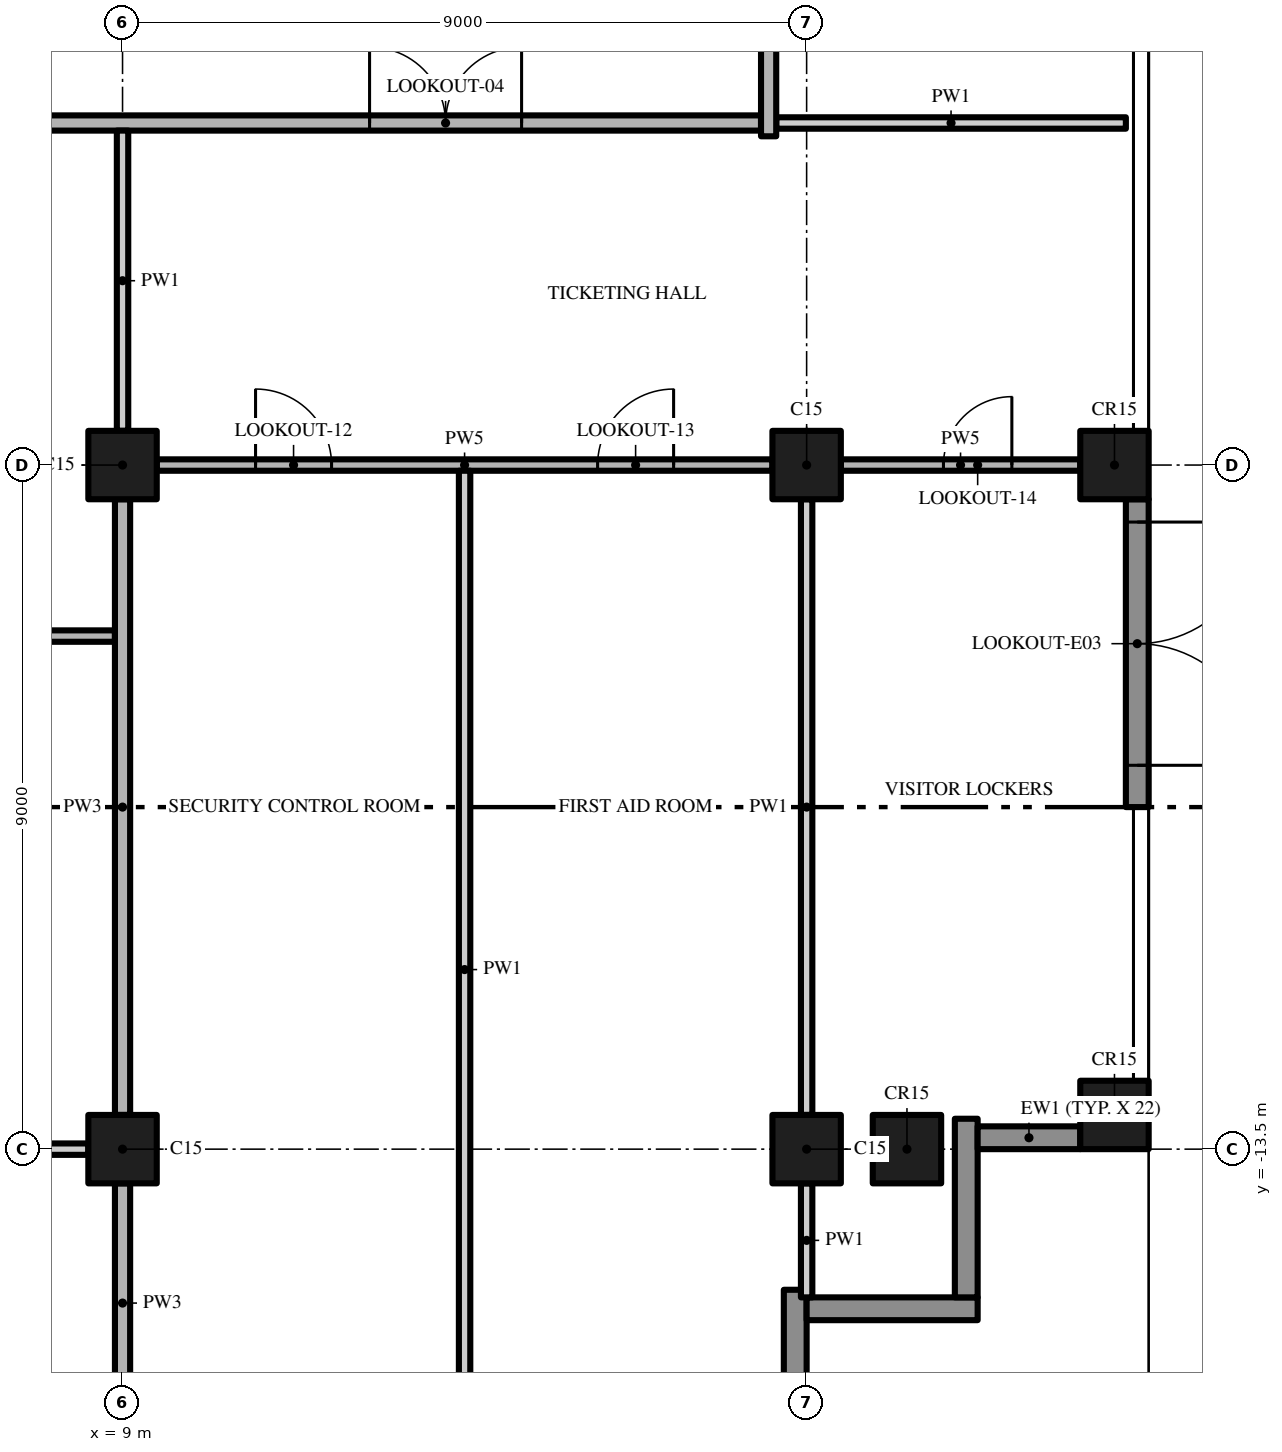
"""IFC4 building model, lengths in metres.
Left out: names, types, materials, properties, quantities, classifications, styles, units other than length and angle.
Written with IfcOpenShell. Run it as: python <this file> out.ifc"""

import sys

from ifc_helpers import new_model, si_unit, direction, frame, frame_2d, origin, origin_2d, place, context, subcontext, project, spatial, rectangle, extrude, element, fill, save


model = new_model("IFC4")
c1 = context("Model", 3, precision=1e-05, world=origin(), true_north=direction((0.0, 1.0)))
c2 = subcontext(c1, "Body", "Model", "MODEL_VIEW")
j1 = project(units=[si_unit("LENGTHUNIT", "METRE"), si_unit("PLANEANGLEUNIT", "RADIAN")], contexts=[c1])
p1 = place(None, origin())
s1 = spatial("IfcSite", under=j1, at=p1, CompositionType="ELEMENT")
p2 = place(p1, origin())
s2 = spatial("IfcBuilding", under=s1, at=p2, CompositionType="ELEMENT")
p3 = place(p2, frame((0.0, 0.0, 297.4)))
s3 = spatial("IfcBuildingStorey", under=s2, at=p3, CompositionType="ELEMENT", Elevation=297.4)
for number, where, z_axis, x_axis in (
    (1, (18.0, -13.5, 0.0), (0.0, 0.0, 1.0), (1.0, 0.0, 0.0)),
    (2, (18.0, -4.5, 0.0), (0.0, 0.0, 1.0), (1.0, 0.0, 0.0)),
    (3, (22.05, -13.05, 0.0), (0.0, 0.0, 1.0), (1.0, 0.0, 0.0)),
    (4, (19.32, -13.5, 0.0), (0.0, 0.0, 1.0), (1.0, 0.0, 0.0)),
    (5, (22.05, -4.5, 0.0), (0.0, 0.0, 1.0), (1.0, 0.0, 0.0)),
    (6, (9.0, -13.5, 0.0), (0.0, 0.0, 1.0), (1.0, 0.0, 0.0)),
    (7, (9.0, -4.5, 0.0), (0.0, 0.0, 1.0), (1.0, 0.0, 0.0)),
):
    element("IfcColumn", number, at=place(p3, frame(where, z_axis=z_axis, x_axis=x_axis)), inside=s3, PredefinedType="COLUMN", context=c2, shape_type="SweptSolid", body=[
        extrude(rectangle(XDim=0.9, YDim=0.9, at=origin_2d()), origin(), (0.0, 0.0, 1.0), 5.65),
    ])
p4 = place(p3, frame((17.85, -15.35, 0.0), z_axis=(0.0, 0.0, 1.0), x_axis=(0.0, -1.0, 0.0)))
e8 = element("IfcWall", 8, at=p4, inside=s3, PredefinedType="SOLIDWALL", context=c2, shape_type="SweptSolid", body=[
    extrude(rectangle(XDim=1.75, YDim=0.3, at=frame_2d((0.875, 0.0))), origin(), (0.0, 0.0, 1.0), 5.65),
])
p5 = place(p3, frame((20.25, -15.6, 0.0), z_axis=(0.0, 0.0, 1.0), x_axis=(-1.0, 0.0, 0.0)))
e9 = element("IfcWall", 9, at=p5, inside=s3, PredefinedType="SOLIDWALL", context=c2, shape_type="SweptSolid", body=[
    extrude(rectangle(XDim=2.25, YDim=0.3, at=frame_2d((1.125, 0.0))), origin(), (0.0, 0.0, 1.0), 5.65),
])
p6 = place(p3, frame((20.1, -13.1, 0.0), z_axis=(0.0, 0.0, 1.0), x_axis=(0.0, -1.0, 0.0)))
e10 = element("IfcWall", 10, at=p6, inside=s3, PredefinedType="SOLIDWALL", context=c2, shape_type="SweptSolid", body=[
    extrude(rectangle(XDim=2.35, YDim=0.3, at=frame_2d((1.175, 0.0))), origin(), (0.0, 0.0, 1.0), 5.65),
])
p7 = place(p3, frame((21.6, -13.35, 0.0), z_axis=(0.0, 0.0, 1.0), x_axis=(-1.0, 0.0, 0.0)))
e11 = element("IfcWall", 11, at=p7, inside=s3, PredefinedType="SOLIDWALL", context=c2, shape_type="SweptSolid", body=[
    extrude(rectangle(XDim=1.35, YDim=0.3, at=frame_2d((0.675, 0.0))), origin(), (0.0, 0.0, 1.0), 5.65),
])
p8 = place(p3, frame((22.35, -4.95, 0.0), z_axis=(0.0, 0.0, 1.0), x_axis=(0.0, -1.0, 0.0)))
e12 = element("IfcWall", 12, at=p8, inside=s3, PredefinedType="SOLIDWALL", context=c2, shape_type="SweptSolid", body=[
    extrude(rectangle(XDim=4.05, YDim=0.3, at=frame_2d((2.025, 0.0))), origin(), (0.0, 0.0, 1.0), 5.65),
])
p9 = place(p8, frame((0.3, 0.0, 0.0)))
e13 = element("IfcOpeningElement", 13, at=p9, cuts=e12, PredefinedType="OPENING", context=c2, shape_type="SweptSolid", body=[
    extrude(rectangle(XDim=3.2, YDim=2.4, at=frame_2d((1.6, 1.2))), frame((0.0, 0.16, 0.0), z_axis=(0.0, -1.0, 0.0), x_axis=(1.0, 0.0, 0.0)), (0.0, 0.0, 1.0), 0.32),
])
p10 = place(p3, frame((2.325, -13.5, 0.0), z_axis=(0.0, 0.0, 1.0), x_axis=(1.0, 0.0, 0.0)))
e14 = element("IfcWall", 14, at=p10, inside=s3, PredefinedType="PARTITIONING", context=c2, shape_type="SweptSolid", body=[
    extrude(rectangle(XDim=6.225, YDim=0.15, at=frame_2d((3.112, 0.0))), origin(), (0.0, 0.0, 1.0), 5.65),
])
p11 = place(p3, frame((-4.425, -6.75, 0.0), z_axis=(0.0, 0.0, 1.0), x_axis=(1.0, 0.0, 0.0)))
e15 = element("IfcWall", 15, at=p11, inside=s3, PredefinedType="PARTITIONING", context=c2, shape_type="SweptSolid", body=[
    extrude(rectangle(XDim=13.325, YDim=0.15, at=frame_2d((6.662, 0.0))), origin(), (0.0, 0.0, 1.0), 5.65),
])
p12 = place(p11, frame((2.85, 0.0, 0.0)))
e16 = element("IfcOpeningElement", 16, at=p12, cuts=e15, PredefinedType="OPENING", context=c2, shape_type="SweptSolid", body=[
    extrude(rectangle(XDim=0.9, YDim=2.1, at=frame_2d((0.45, 1.05))), frame((0.0, 0.085, 0.0), z_axis=(0.0, -1.0, 0.0), x_axis=(1.0, 0.0, 0.0)), (0.0, 0.0, 1.0), 0.17),
])
p13 = place(p11, frame((9.525, 0.0, 0.0)))
e17 = element("IfcOpeningElement", 17, at=p13, cuts=e15, PredefinedType="OPENING", context=c2, shape_type="SweptSolid", body=[
    extrude(rectangle(XDim=1.0, YDim=2.4, at=frame_2d((0.5, 1.2))), frame((0.0, 0.085, 0.0), z_axis=(0.0, -1.0, 0.0), x_axis=(1.0, 0.0, 0.0)), (0.0, 0.0, 1.0), 0.17),
])
p14 = place(p3, frame((9.45, -4.5, 0.0), z_axis=(0.0, 0.0, 1.0), x_axis=(1.0, 0.0, 0.0)))
e18 = element("IfcWall", 18, at=p14, inside=s3, PredefinedType="PARTITIONING", context=c2, shape_type="SweptSolid", body=[
    extrude(rectangle(XDim=8.1, YDim=0.15, at=frame_2d((4.05, 0.0))), origin(), (0.0, 0.0, 1.0), 5.65),
])
p15 = place(p14, frame((1.3, 0.0, 0.0)))
e19 = element("IfcOpeningElement", 19, at=p15, cuts=e18, PredefinedType="OPENING", context=c2, shape_type="SweptSolid", body=[
    extrude(rectangle(XDim=1.0, YDim=2.4, at=frame_2d((0.5, 1.2))), frame((0.0, 0.085, 0.0), z_axis=(0.0, -1.0, 0.0), x_axis=(1.0, 0.0, 0.0)), (0.0, 0.0, 1.0), 0.17),
])
p16 = place(p14, frame((5.8, 0.0, 0.0)))
e20 = element("IfcOpeningElement", 20, at=p16, cuts=e18, PredefinedType="OPENING", context=c2, shape_type="SweptSolid", body=[
    extrude(rectangle(XDim=1.0, YDim=2.4, at=frame_2d((0.5, 1.2))), frame((0.0, 0.085, 0.0), z_axis=(0.0, -1.0, 0.0), x_axis=(1.0, 0.0, 0.0)), (0.0, 0.0, 1.0), 0.17),
])
p17 = place(p3, frame((18.45, -4.5, 0.0), z_axis=(0.0, 0.0, 1.0), x_axis=(1.0, 0.0, 0.0)))
e21 = element("IfcWall", 21, at=p17, inside=s3, PredefinedType="PARTITIONING", context=c2, shape_type="SweptSolid", body=[
    extrude(rectangle(XDim=3.15, YDim=0.15, at=frame_2d((1.575, 0.0))), origin(), (0.0, 0.0, 1.0), 5.65),
])
p18 = place(p17, frame((1.35, 0.0, 0.0)))
e22 = element("IfcOpeningElement", 22, at=p18, cuts=e21, PredefinedType="OPENING", context=c2, shape_type="SweptSolid", body=[
    extrude(rectangle(XDim=0.9, YDim=2.1, at=frame_2d((0.45, 1.05))), frame((0.0, 0.085, 0.0), z_axis=(0.0, -1.0, 0.0), x_axis=(1.0, 0.0, 0.0)), (0.0, 0.0, 1.0), 0.17),
])
p19 = place(p3, frame((-17.4, 0.0, 0.0), z_axis=(0.0, 0.0, 1.0), x_axis=(1.0, 0.0, 0.0)))
e23 = element("IfcWall", 23, at=p19, inside=s3, PredefinedType="PARTITIONING", context=c2, shape_type="SweptSolid", body=[
    extrude(rectangle(XDim=34.8, YDim=0.2, at=frame_2d((17.4, 0.0))), origin(), (0.0, 0.0, 1.0), 5.65),
])
p20 = place(p19, frame((0.9, 0.0, 0.0)))
e24 = element("IfcOpeningElement", 24, at=p20, cuts=e23, PredefinedType="OPENING", context=c2, shape_type="SweptSolid", body=[
    extrude(rectangle(XDim=2.0, YDim=2.4, at=frame_2d((1.0, 1.2))), frame((0.0, 0.11, 0.0), z_axis=(0.0, -1.0, 0.0), x_axis=(1.0, 0.0, 0.0)), (0.0, 0.0, 1.0), 0.22),
])
p21 = place(p19, frame((7.4, 0.0, 0.0)))
e25 = element("IfcOpeningElement", 25, at=p21, cuts=e23, PredefinedType="OPENING", context=c2, shape_type="SweptSolid", body=[
    extrude(rectangle(XDim=2.0, YDim=2.4, at=frame_2d((1.0, 1.2))), frame((0.0, 0.11, 0.0), z_axis=(0.0, -1.0, 0.0), x_axis=(1.0, 0.0, 0.0)), (0.0, 0.0, 1.0), 0.22),
])
p22 = place(p19, frame((18.65, 0.0, 0.0)))
e26 = element("IfcOpeningElement", 26, at=p22, cuts=e23, PredefinedType="OPENING", context=c2, shape_type="SweptSolid", body=[
    extrude(rectangle(XDim=2.0, YDim=2.4, at=frame_2d((1.0, 1.2))), frame((0.0, 0.11, 0.0), z_axis=(0.0, -1.0, 0.0), x_axis=(1.0, 0.0, 0.0)), (0.0, 0.0, 1.0), 0.22),
])
p23 = place(p19, frame((29.65, 0.0, 0.0)))
e27 = element("IfcOpeningElement", 27, at=p23, cuts=e23, PredefinedType="OPENING", context=c2, shape_type="SweptSolid", body=[
    extrude(rectangle(XDim=2.0, YDim=2.4, at=frame_2d((1.0, 1.2))), frame((0.0, 0.11, 0.0), z_axis=(0.0, -1.0, 0.0), x_axis=(1.0, 0.0, 0.0)), (0.0, 0.0, 1.0), 0.22),
])
p24 = place(p3, frame((17.6, 0.0, 0.0), z_axis=(0.0, 0.0, 1.0), x_axis=(1.0, 0.0, 0.0)))
e28 = element("IfcWall", 28, at=p24, inside=s3, PredefinedType="PARTITIONING", context=c2, shape_type="SweptSolid", body=[
    extrude(rectangle(XDim=4.6, YDim=0.15, at=frame_2d((2.3, 0.0))), origin(), (0.0, 0.0, 1.0), 5.65),
])
p25 = place(p3, frame((9.0, -4.05, 0.0), z_axis=(0.0, 0.0, 1.0), x_axis=(0.0, 1.0, 0.0)))
e29 = element("IfcWall", 29, at=p25, inside=s3, PredefinedType="PARTITIONING", context=c2, shape_type="SweptSolid", body=[
    extrude(rectangle(XDim=3.95, YDim=0.15, at=frame_2d((1.975, 0.0))), origin(), (0.0, 0.0, 1.0), 5.65),
])
p26 = place(p3, frame((9.0, -17.1, 0.0), z_axis=(0.0, 0.0, 1.0), x_axis=(0.0, 1.0, 0.0)))
e30 = element("IfcWall", 30, at=p26, inside=s3, PredefinedType="PARTITIONING", context=c2, shape_type="SweptSolid", body=[
    extrude(rectangle(XDim=3.15, YDim=0.2, at=frame_2d((1.575, 0.0))), origin(), (0.0, 0.0, 1.0), 5.65),
])
p27 = place(p3, frame((9.0, -13.05, 0.0), z_axis=(0.0, 0.0, 1.0), x_axis=(0.0, 1.0, 0.0)))
e31 = element("IfcWall", 31, at=p27, inside=s3, PredefinedType="PARTITIONING", context=c2, shape_type="SweptSolid", body=[
    extrude(rectangle(XDim=8.1, YDim=0.2, at=frame_2d((4.05, 0.0))), origin(), (0.0, 0.0, 1.0), 5.65),
])
p28 = place(p3, frame((13.5, -17.7, 0.0), z_axis=(0.0, 0.0, 1.0), x_axis=(0.0, 1.0, 0.0)))
e32 = element("IfcWall", 32, at=p28, inside=s3, PredefinedType="PARTITIONING", context=c2, shape_type="SweptSolid", body=[
    extrude(rectangle(XDim=13.125, YDim=0.15, at=frame_2d((6.562, 0.0))), origin(), (0.0, 0.0, 1.0), 5.65),
])
p29 = place(p3, frame((17.5, -0.175, 0.0), z_axis=(0.0, 0.0, 1.0), x_axis=(0.0, 1.0, 0.0)))
e33 = element("IfcWall", 33, at=p29, inside=s3, PredefinedType="PARTITIONING", context=c2, shape_type="SweptSolid", body=[
    extrude(rectangle(XDim=4.225, YDim=0.2, at=frame_2d((2.112, 0.0))), origin(), (0.0, 0.0, 1.0), 5.65),
])
p30 = place(p3, frame((18.0, -15.45, 0.0), z_axis=(0.0, 0.0, 1.0), x_axis=(0.0, 1.0, 0.0)))
e34 = element("IfcWall", 34, at=p30, inside=s3, PredefinedType="PARTITIONING", context=c2, shape_type="SweptSolid", body=[
    extrude(rectangle(XDim=1.5, YDim=0.15, at=frame_2d((0.75, 0.0))), origin(), (0.0, 0.0, 1.0), 5.65),
])
p31 = place(p3, frame((18.0, -13.05, 0.0), z_axis=(0.0, 0.0, 1.0), x_axis=(0.0, 1.0, 0.0)))
e35 = element("IfcWall", 35, at=p31, inside=s3, PredefinedType="PARTITIONING", context=c2, shape_type="SweptSolid", body=[
    extrude(rectangle(XDim=8.1, YDim=0.15, at=frame_2d((4.05, 0.0))), origin(), (0.0, 0.0, 1.0), 5.65),
])
p32 = place(p9, origin())
e36 = element("IfcDoor", 36, at=p32, inside=s3, OperationType="SINGLE_SWING_LEFT", PredefinedType="DOOR", context=c2, shape_type="SweptSolid", body=[
    extrude(rectangle(XDim=3.2, YDim=2.4, at=frame_2d((1.6, 1.2))), frame((0.0, 0.025, 0.0), z_axis=(0.0, -1.0, 0.0), x_axis=(1.0, 0.0, 0.0)), (0.0, 0.0, 1.0), 0.05),
])
fill(e13, e36)
p33 = place(p23, origin())
e37 = element("IfcDoor", 37, at=p33, inside=s3, OperationType="DOUBLE_DOOR_SINGLE_SWING", PredefinedType="DOOR", context=c2, shape_type="SweptSolid", body=[
    extrude(rectangle(XDim=2.0, YDim=2.4, at=frame_2d((1.0, 1.2))), frame((0.0, 0.025, 0.0), z_axis=(0.0, -1.0, 0.0), x_axis=(1.0, 0.0, 0.0)), (0.0, 0.0, 1.0), 0.05),
])
fill(e27, e37)
p34 = place(p15, origin())
e38 = element("IfcDoor", 38, at=p34, inside=s3, OperationType="SINGLE_SWING_LEFT", PredefinedType="DOOR", context=c2, shape_type="SweptSolid", body=[
    extrude(rectangle(XDim=1.0, YDim=2.4, at=frame_2d((0.5, 1.2))), frame((0.0, 0.025, 0.0), z_axis=(0.0, -1.0, 0.0), x_axis=(1.0, 0.0, 0.0)), (0.0, 0.0, 1.0), 0.05),
])
fill(e19, e38)
p35 = place(p16, origin())
e39 = element("IfcDoor", 39, at=p35, inside=s3, OperationType="SINGLE_SWING_RIGHT", PredefinedType="DOOR", context=c2, shape_type="SweptSolid", body=[
    extrude(rectangle(XDim=1.0, YDim=2.4, at=frame_2d((0.5, 1.2))), frame((0.0, 0.025, 0.0), z_axis=(0.0, -1.0, 0.0), x_axis=(1.0, 0.0, 0.0)), (0.0, 0.0, 1.0), 0.05),
])
fill(e20, e39)
p36 = place(p18, origin())
e40 = element("IfcDoor", 40, at=p36, inside=s3, OperationType="SINGLE_SWING_RIGHT", PredefinedType="DOOR", context=c2, shape_type="SweptSolid", body=[
    extrude(rectangle(XDim=0.9, YDim=2.1, at=frame_2d((0.45, 1.05))), frame((0.0, 0.025, 0.0), z_axis=(0.0, -1.0, 0.0), x_axis=(1.0, 0.0, 0.0)), (0.0, 0.0, 1.0), 0.05),
])
fill(e22, e40)
save(model, sys.argv[1])
